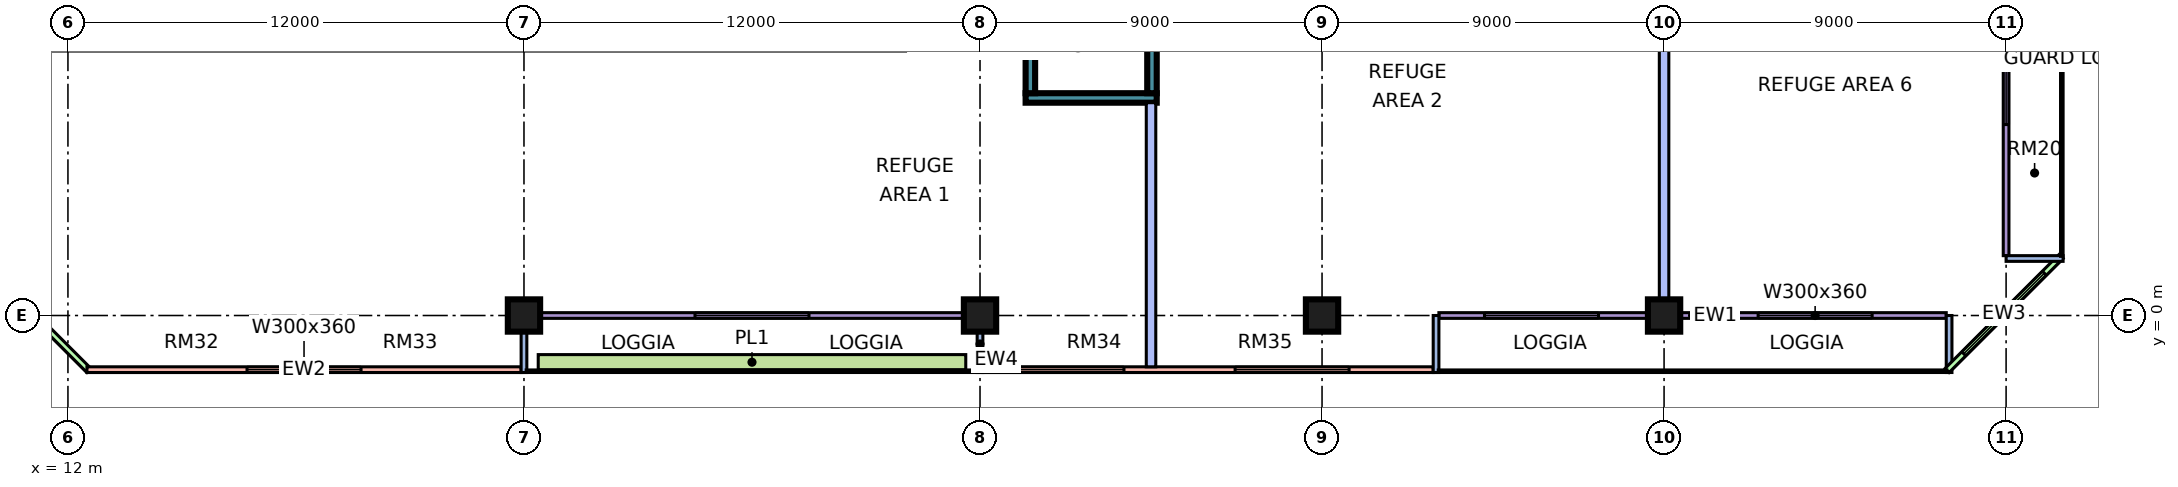
"""IFC4 building model, lengths in metres.
Left out: names, types, materials, properties, quantities, classifications, styles, units other than length and angle.
Written with IfcOpenShell. Run it as: python <this file> out.ifc"""

import sys

from ifc_helpers import new_model, si_unit, direction, frame, frame_2d, origin, origin_2d, place, context, subcontext, project, spatial, rectangle, extrude, element, fill, save


model = new_model("IFC4")
c1 = context("Model", 3, precision=1e-05, world=origin(), true_north=direction((0.0, 1.0)))
c2 = subcontext(c1, "Body", "Model", "MODEL_VIEW")
j1 = project(units=[si_unit("LENGTHUNIT", "METRE"), si_unit("PLANEANGLEUNIT", "RADIAN")], contexts=[c1])
p1 = place(None, origin())
s1 = spatial("IfcSite", under=j1, at=p1, CompositionType="ELEMENT")
p2 = place(p1, origin())
s2 = spatial("IfcBuilding", under=s1, at=p2, CompositionType="ELEMENT")
p3 = place(p2, frame((0.0, 0.0, 256.65)))
s3 = spatial("IfcBuildingStorey", under=s2, at=p3, CompositionType="ELEMENT", Elevation=256.65)
for number, where, z_axis, x_axis in (
    (1, (24.0, 0.0, 0.0), (0.0, 0.0, 1.0), (1.0, 0.0, 0.0)),
    (2, (36.0, 0.0, 0.0), (0.0, 0.0, 1.0), (1.0, 0.0, 0.0)),
    (3, (45.0, 0.0, 0.0), (0.0, 0.0, 1.0), (1.0, 0.0, 0.0)),
    (4, (54.0, 0.0, 0.0), (0.0, 0.0, 1.0), (1.0, 0.0, 0.0)),
):
    element("IfcColumn", number, at=place(p3, frame(where, z_axis=z_axis, x_axis=x_axis)), inside=s3, PredefinedType="COLUMN", context=c2, shape_type="SweptSolid", body=[
        extrude(rectangle(XDim=0.85, YDim=0.85, at=origin_2d()), origin(), (0.0, 0.0, 1.0), 5.5),
    ])
p4 = place(p3, frame((37.2, 5.725, 0.0), z_axis=(0.0, 0.0, 1.0), x_axis=(1.0, 0.0, 0.0)))
e5 = element("IfcWall", 5, at=p4, inside=s3, PredefinedType="SHEAR", context=c2, shape_type="SweptSolid", body=[
    extrude(rectangle(XDim=3.45, YDim=0.25, at=frame_2d((1.725, 0.0))), origin(), (0.0, 0.0, 1.0), 5.5),
])
for number, where, z_axis, x_axis in (
    (6, (37.325, 5.85, 0.0), (0.0, 0.0, 1.0), (0.0, 1.0, 0.0)),
    (7, (40.525, 5.85, 0.0), (0.0, 0.0, 1.0), (0.0, 1.0, 0.0)),
):
    element("IfcWall", number, at=place(p3, frame(where, z_axis=z_axis, x_axis=x_axis)), inside=s3, PredefinedType="SHEAR", context=c2, shape_type="SweptSolid", body=[
        extrude(rectangle(XDim=6.5, YDim=0.25, at=frame_2d((3.25, 0.0))), origin(), (0.0, 0.0, 1.0), 5.5),
    ])
p5 = place(p3, frame((-1.447, 12.553, 0.0), z_axis=(0.0, 0.0, 1.0), x_axis=(0.707106781187, -0.707106781187, 0.0)))
e8 = element("IfcWall", 8, at=p5, inside=s3, PredefinedType="SOLIDWALL", context=c2, shape_type="SweptSolid", body=[
    extrude(rectangle(XDim=19.799, YDim=0.15, at=frame_2d((9.899, 0.0))), origin(), (0.0, 0.0, 1.0), 5.05),
])
p6 = place(p5, frame((11.453, 0.0, 0.45)))
e9 = element("IfcOpeningElement", 9, at=p6, cuts=e8, PredefinedType="OPENING", context=c2, shape_type="SweptSolid", body=[
    extrude(rectangle(XDim=3.0, YDim=3.6, at=frame_2d((1.5, 1.8))), frame((0.0, 0.085, 0.0), z_axis=(0.0, -1.0, 0.0), x_axis=(1.0, 0.0, 0.0)), (0.0, 0.0, 1.0), 0.17),
])
p7 = place(p3, frame((12.5, -1.425, 0.0), z_axis=(0.0, 0.0, 1.0), x_axis=(1.0, 0.0, 0.0)))
e10 = element("IfcWall", 10, at=p7, inside=s3, PredefinedType="SOLIDWALL", context=c2, shape_type="SweptSolid", body=[
    extrude(rectangle(XDim=11.425, YDim=0.15, at=frame_2d((5.712, 0.0))), origin(), (0.0, 0.0, 1.0), 5.05),
])
p8 = place(p7, frame((4.212, 0.0, 0.45)))
e11 = element("IfcOpeningElement", 11, at=p8, cuts=e10, PredefinedType="OPENING", context=c2, shape_type="SweptSolid", body=[
    extrude(rectangle(XDim=3.0, YDim=3.6, at=frame_2d((1.5, 1.8))), frame((0.0, 0.085, 0.0), z_axis=(0.0, -1.0, 0.0), x_axis=(1.0, 0.0, 0.0)), (0.0, 0.0, 1.0), 0.17),
])
p9 = place(p3, frame((24.075, 0.0, 0.0), z_axis=(0.0, 0.0, 1.0), x_axis=(1.0, 0.0, 0.0)))
e12 = element("IfcWall", 12, at=p9, inside=s3, PredefinedType="SOLIDWALL", context=c2, shape_type="SweptSolid", body=[
    extrude(rectangle(XDim=11.85, YDim=0.15, at=frame_2d((5.925, 0.0))), origin(), (0.0, 0.0, 1.0), 5.05),
])
p10 = place(p9, frame((4.425, 0.0, 0.45)))
e13 = element("IfcOpeningElement", 13, at=p10, cuts=e12, PredefinedType="OPENING", context=c2, shape_type="SweptSolid", body=[
    extrude(rectangle(XDim=3.0, YDim=3.6, at=frame_2d((1.5, 1.8))), frame((0.0, 0.085, 0.0), z_axis=(0.0, -1.0, 0.0), x_axis=(1.0, 0.0, 0.0)), (0.0, 0.0, 1.0), 0.17),
])
for number, where, z_axis, x_axis in (
    (14, (24.0, -1.5, 0.0), (0.0, 0.0, 1.0), (0.0, 1.0, 0.0)),
    (15, (36.0, -1.5, 0.0), (0.0, 0.0, 1.0), (0.0, 1.0, 0.0)),
):
    element("IfcWall", number, at=place(p3, frame(where, z_axis=z_axis, x_axis=x_axis)), inside=s3, PredefinedType="SOLIDWALL", context=c2, shape_type="SweptSolid", body=[
        extrude(rectangle(XDim=1.5, YDim=0.15, at=frame_2d((0.75, 0.0))), origin(), (0.0, 0.0, 1.0), 5.05),
    ])
p11 = place(p3, frame((36.075, -1.425, 0.0), z_axis=(0.0, 0.0, 1.0), x_axis=(1.0, 0.0, 0.0)))
e16 = element("IfcWall", 16, at=p11, inside=s3, PredefinedType="SOLIDWALL", context=c2, shape_type="SweptSolid", body=[
    extrude(rectangle(XDim=11.85, YDim=0.15, at=frame_2d((5.925, 0.0))), origin(), (0.0, 0.0, 1.0), 5.05),
])
p12 = place(p11, frame((0.712, 0.0, 0.45)))
e17 = element("IfcOpeningElement", 17, at=p12, cuts=e16, PredefinedType="OPENING", context=c2, shape_type="SweptSolid", body=[
    extrude(rectangle(XDim=3.0, YDim=3.6, at=frame_2d((1.5, 1.8))), frame((0.0, 0.085, 0.0), z_axis=(0.0, -1.0, 0.0), x_axis=(1.0, 0.0, 0.0)), (0.0, 0.0, 1.0), 0.17),
])
p13 = place(p11, frame((6.637, 0.0, 0.45)))
e18 = element("IfcOpeningElement", 18, at=p13, cuts=e16, PredefinedType="OPENING", context=c2, shape_type="SweptSolid", body=[
    extrude(rectangle(XDim=3.0, YDim=3.6, at=frame_2d((1.5, 1.8))), frame((0.0, 0.085, 0.0), z_axis=(0.0, -1.0, 0.0), x_axis=(1.0, 0.0, 0.0)), (0.0, 0.0, 1.0), 0.17),
])
p14 = place(p3, frame((48.075, 0.0, 0.0), z_axis=(0.0, 0.0, 1.0), x_axis=(1.0, 0.0, 0.0)))
e19 = element("IfcWall", 19, at=p14, inside=s3, PredefinedType="SOLIDWALL", context=c2, shape_type="SweptSolid", body=[
    extrude(rectangle(XDim=13.35, YDim=0.15, at=frame_2d((6.675, 0.0))), origin(), (0.0, 0.0, 1.0), 5.05),
])
p15 = place(p14, frame((1.2, 0.0, 0.45)))
e20 = element("IfcOpeningElement", 20, at=p15, cuts=e19, PredefinedType="OPENING", context=c2, shape_type="SweptSolid", body=[
    extrude(rectangle(XDim=3.0, YDim=3.6, at=frame_2d((1.5, 1.8))), frame((0.0, 0.085, 0.0), z_axis=(0.0, -1.0, 0.0), x_axis=(1.0, 0.0, 0.0)), (0.0, 0.0, 1.0), 0.17),
])
p16 = place(p14, frame((8.4, 0.0, 0.45)))
e21 = element("IfcOpeningElement", 21, at=p16, cuts=e19, PredefinedType="OPENING", context=c2, shape_type="SweptSolid", body=[
    extrude(rectangle(XDim=3.0, YDim=3.6, at=frame_2d((1.5, 1.8))), frame((0.0, 0.085, 0.0), z_axis=(0.0, -1.0, 0.0), x_axis=(1.0, 0.0, 0.0)), (0.0, 0.0, 1.0), 0.17),
])
for number, where, z_axis, x_axis in (
    (22, (48.0, -1.5, 0.0), (0.0, 0.0, 1.0), (0.0, 1.0, 0.0)),
    (23, (61.5, -1.5, 0.0), (0.0, 0.0, 1.0), (0.0, 1.0, 0.0)),
):
    element("IfcWall", number, at=place(p3, frame(where, z_axis=z_axis, x_axis=x_axis)), inside=s3, PredefinedType="SOLIDWALL", context=c2, shape_type="SweptSolid", body=[
        extrude(rectangle(XDim=1.5, YDim=0.15, at=frame_2d((0.75, 0.0))), origin(), (0.0, 0.0, 1.0), 5.05),
    ])
p17 = place(p3, frame((61.447, -1.447, 0.0), z_axis=(0.0, 0.0, 1.0), x_axis=(0.707106781187, 0.707106781187, 0.0)))
e24 = element("IfcWall", 24, at=p17, inside=s3, PredefinedType="SOLIDWALL", context=c2, shape_type="SweptSolid", body=[
    extrude(rectangle(XDim=4.243, YDim=0.15, at=frame_2d((2.121, 0.0))), origin(), (0.0, 0.0, 1.0), 5.05),
])
p18 = place(p17, frame((0.621, 0.0, 0.45)))
e25 = element("IfcOpeningElement", 25, at=p18, cuts=e24, PredefinedType="OPENING", context=c2, shape_type="SweptSolid", body=[
    extrude(rectangle(XDim=3.0, YDim=3.6, at=frame_2d((1.5, 1.8))), frame((0.0, 0.085, 0.0), z_axis=(0.0, -1.0, 0.0), x_axis=(1.0, 0.0, 0.0)), (0.0, 0.0, 1.0), 0.17),
])
p19 = place(p3, frame((63.0, 1.575, 0.0), z_axis=(0.0, 0.0, 1.0), x_axis=(0.0, 1.0, 0.0)))
e26 = element("IfcWall", 26, at=p19, inside=s3, PredefinedType="SOLIDWALL", context=c2, shape_type="SweptSolid", body=[
    extrude(rectangle(XDim=10.35, YDim=0.15, at=frame_2d((5.175, 0.0))), origin(), (0.0, 0.0, 1.0), 5.05),
])
p20 = place(p19, frame((3.45, 0.0, 0.45)))
e27 = element("IfcOpeningElement", 27, at=p20, cuts=e26, PredefinedType="OPENING", context=c2, shape_type="SweptSolid", body=[
    extrude(rectangle(XDim=3.0, YDim=3.6, at=frame_2d((1.5, 1.8))), frame((0.0, 0.085, 0.0), z_axis=(0.0, -1.0, 0.0), x_axis=(1.0, 0.0, 0.0)), (0.0, 0.0, 1.0), 0.17),
])
p21 = place(p3, frame((64.5, 1.5, 0.0), z_axis=(0.0, 0.0, 1.0), x_axis=(-1.0, 0.0, 0.0)))
e28 = element("IfcWall", 28, at=p21, inside=s3, PredefinedType="SOLIDWALL", context=c2, shape_type="SweptSolid", body=[
    extrude(rectangle(XDim=1.5, YDim=0.15, at=frame_2d((0.75, 0.0))), origin(), (0.0, 0.0, 1.0), 5.05),
])
p22 = place(p3, frame((24.375, -1.229, 0.0), z_axis=(0.0, 0.0, 1.0), x_axis=(1.0, 0.0, 0.0)))
e29 = element("IfcWall", 29, at=p22, inside=s3, PredefinedType="SOLIDWALL", context=c2, shape_type="SweptSolid", body=[
    extrude(rectangle(XDim=11.25, YDim=0.4, at=frame_2d((5.625, 0.0))), origin(), (0.0, 0.0, 1.0), 0.7),
])
p23 = place(p3, frame((40.5, -1.35, 0.0), z_axis=(0.0, 0.0, 1.0), x_axis=(0.0, 1.0, 0.0)))
e30 = element("IfcWall", 30, at=p23, inside=s3, PredefinedType="PARTITIONING", context=c2, shape_type="SweptSolid", body=[
    extrude(rectangle(XDim=6.95, YDim=0.25, at=frame_2d((3.475, 0.0))), origin(), (0.0, 0.0, 1.0), 5.05),
])
p24 = place(p3, frame((54.0, 0.074, 0.0), z_axis=(0.0, 0.0, 1.0), x_axis=(0.0, 1.0, 0.0)))
e31 = element("IfcWall", 31, at=p24, inside=s3, PredefinedType="PARTITIONING", context=c2, shape_type="SweptSolid", body=[
    extrude(rectangle(XDim=11.801, YDim=0.25, at=frame_2d((5.9, 0.0))), origin(), (0.0, 0.0, 1.0), 5.05),
])
p25 = place(p8, origin())
e32 = element("IfcWindow", 32, at=p25, inside=s3, PartitioningType="SINGLE_PANEL", PredefinedType="WINDOW", context=c2, shape_type="SweptSolid", body=[
    extrude(rectangle(XDim=3.0, YDim=3.6, at=frame_2d((1.5, 1.8))), frame((0.0, 0.03, 0.0), z_axis=(0.0, -1.0, 0.0), x_axis=(1.0, 0.0, 0.0)), (0.0, 0.0, 1.0), 0.06),
])
fill(e11, e32)
p26 = place(p10, origin())
e33 = element("IfcWindow", 33, at=p26, inside=s3, PartitioningType="SINGLE_PANEL", PredefinedType="WINDOW", context=c2, shape_type="SweptSolid", body=[
    extrude(rectangle(XDim=3.0, YDim=3.6, at=frame_2d((1.5, 1.8))), frame((0.0, 0.03, 0.0), z_axis=(0.0, -1.0, 0.0), x_axis=(1.0, 0.0, 0.0)), (0.0, 0.0, 1.0), 0.06),
])
fill(e13, e33)
p27 = place(p12, origin())
e34 = element("IfcWindow", 34, at=p27, inside=s3, PartitioningType="SINGLE_PANEL", PredefinedType="WINDOW", context=c2, shape_type="SweptSolid", body=[
    extrude(rectangle(XDim=3.0, YDim=3.6, at=frame_2d((1.5, 1.8))), frame((0.0, 0.03, 0.0), z_axis=(0.0, -1.0, 0.0), x_axis=(1.0, 0.0, 0.0)), (0.0, 0.0, 1.0), 0.06),
])
fill(e17, e34)
p28 = place(p13, origin())
e35 = element("IfcWindow", 35, at=p28, inside=s3, PartitioningType="SINGLE_PANEL", PredefinedType="WINDOW", context=c2, shape_type="SweptSolid", body=[
    extrude(rectangle(XDim=3.0, YDim=3.6, at=frame_2d((1.5, 1.8))), frame((0.0, 0.03, 0.0), z_axis=(0.0, -1.0, 0.0), x_axis=(1.0, 0.0, 0.0)), (0.0, 0.0, 1.0), 0.06),
])
fill(e18, e35)
p29 = place(p15, origin())
e36 = element("IfcWindow", 36, at=p29, inside=s3, PartitioningType="SINGLE_PANEL", PredefinedType="WINDOW", context=c2, shape_type="SweptSolid", body=[
    extrude(rectangle(XDim=3.0, YDim=3.6, at=frame_2d((1.5, 1.8))), frame((0.0, 0.03, 0.0), z_axis=(0.0, -1.0, 0.0), x_axis=(1.0, 0.0, 0.0)), (0.0, 0.0, 1.0), 0.06),
])
fill(e20, e36)
p30 = place(p16, origin())
e37 = element("IfcWindow", 37, at=p30, inside=s3, PartitioningType="SINGLE_PANEL", PredefinedType="WINDOW", context=c2, shape_type="SweptSolid", body=[
    extrude(rectangle(XDim=3.0, YDim=3.6, at=frame_2d((1.5, 1.8))), frame((0.0, 0.03, 0.0), z_axis=(0.0, -1.0, 0.0), x_axis=(1.0, 0.0, 0.0)), (0.0, 0.0, 1.0), 0.06),
])
fill(e21, e37)
p31 = place(p18, origin())
e38 = element("IfcWindow", 38, at=p31, inside=s3, PartitioningType="SINGLE_PANEL", PredefinedType="WINDOW", context=c2, shape_type="SweptSolid", body=[
    extrude(rectangle(XDim=3.0, YDim=3.6, at=frame_2d((1.5, 1.8))), frame((0.0, 0.03, 0.0), z_axis=(0.0, -1.0, 0.0), x_axis=(1.0, 0.0, 0.0)), (0.0, 0.0, 1.0), 0.06),
])
fill(e25, e38)
p32 = place(p20, origin())
e39 = element("IfcWindow", 39, at=p32, inside=s3, PartitioningType="SINGLE_PANEL", PredefinedType="WINDOW", context=c2, shape_type="SweptSolid", body=[
    extrude(rectangle(XDim=3.0, YDim=3.6, at=frame_2d((1.5, 1.8))), frame((0.0, 0.03, 0.0), z_axis=(0.0, -1.0, 0.0), x_axis=(1.0, 0.0, 0.0)), (0.0, 0.0, 1.0), 0.06),
])
fill(e27, e39)
save(model, sys.argv[1])
